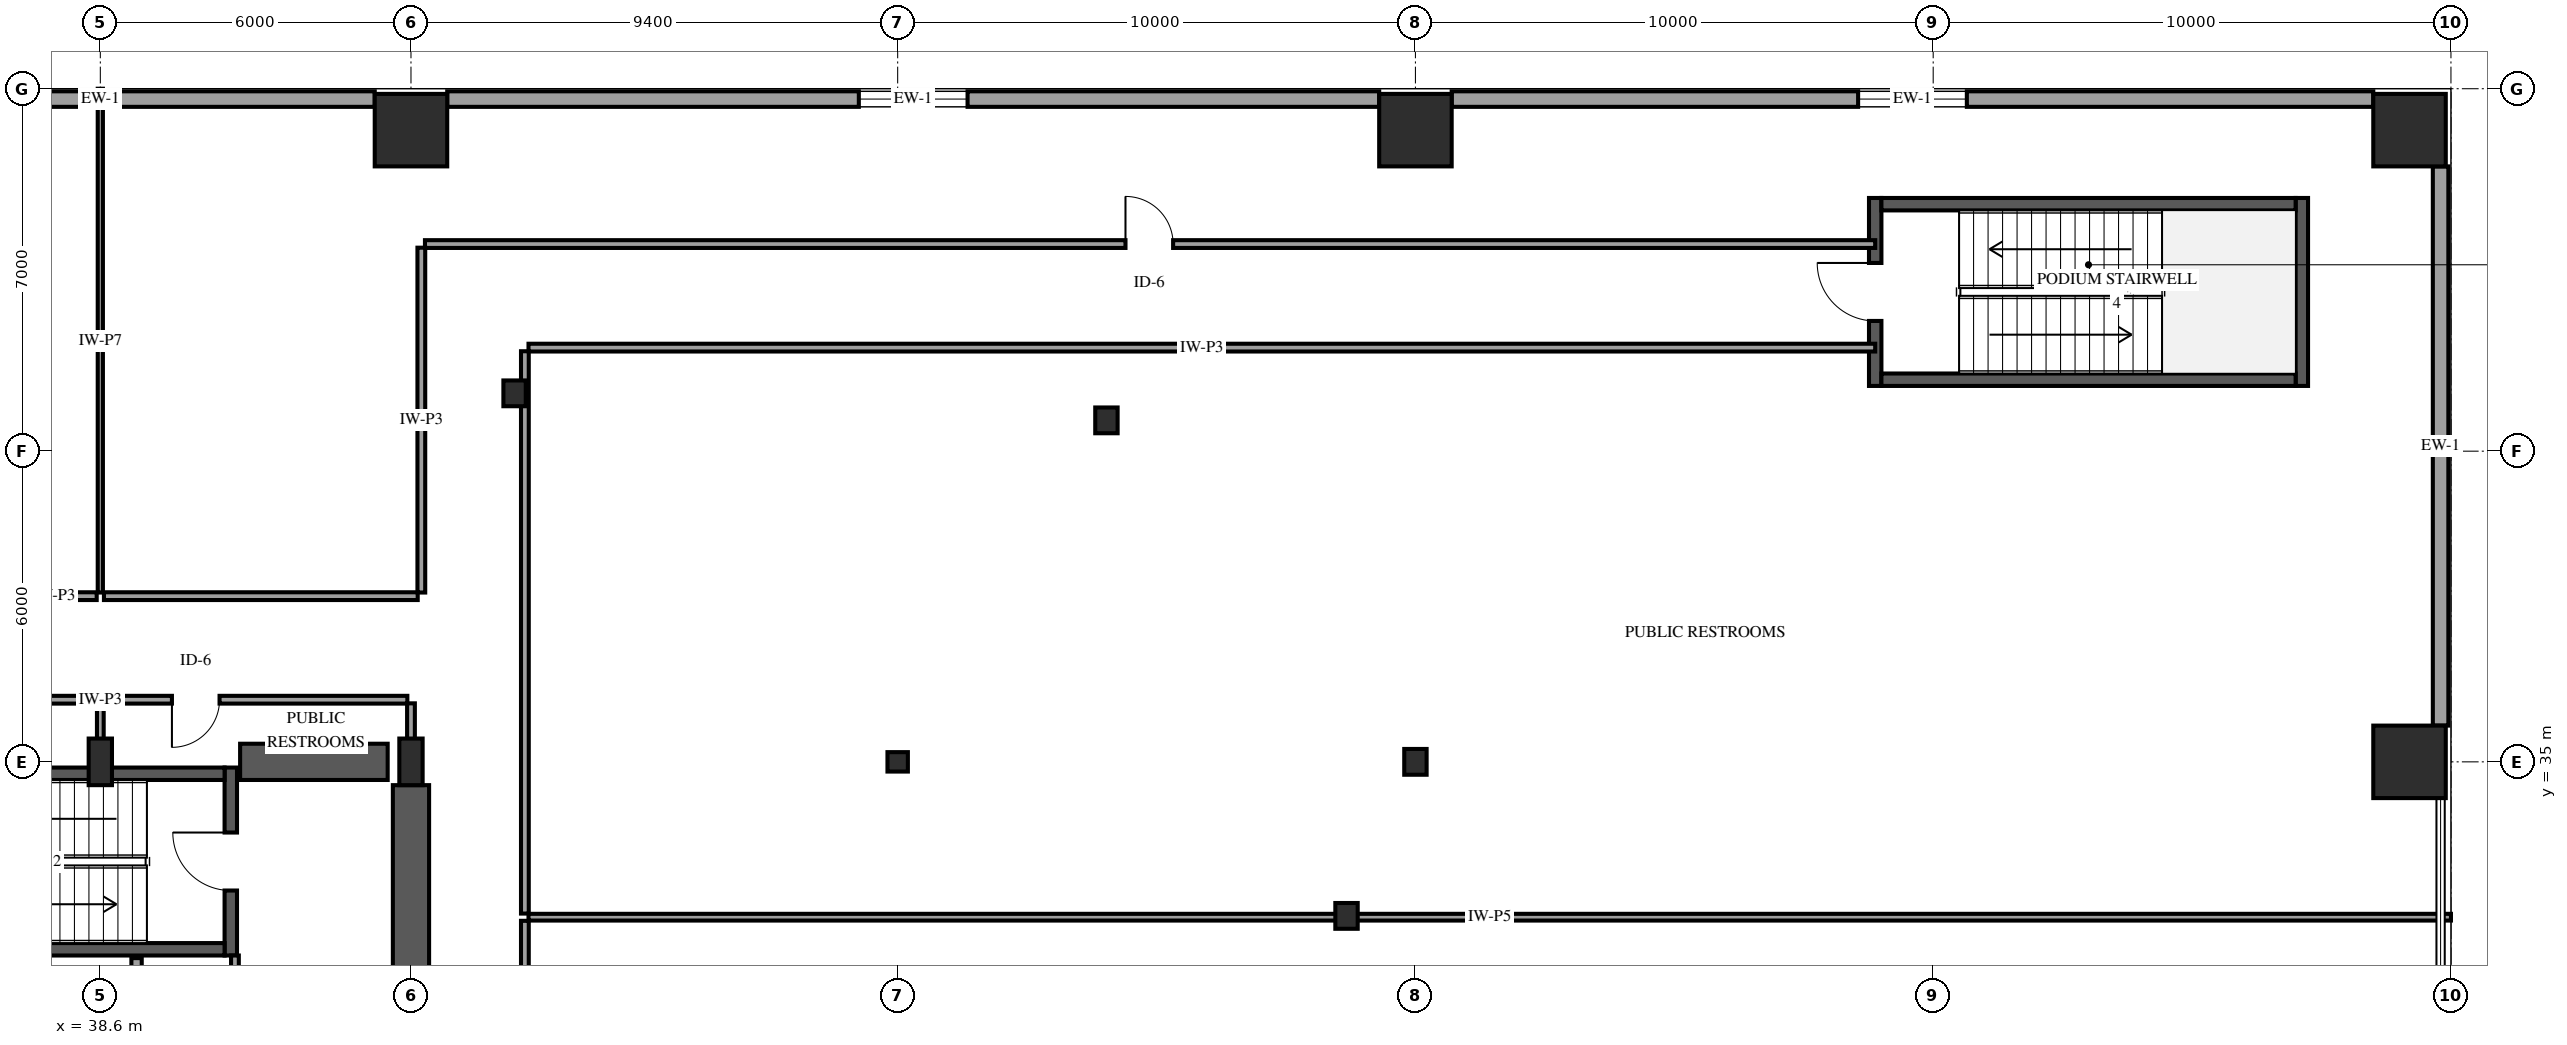
"""IFC4 building model, lengths in metres.
Left out: names, types, materials, properties, quantities, classifications, styles, units other than length and angle.
Written with IfcOpenShell. Run it as: python <this file> out.ifc"""

import sys

from ifc_helpers import new_model, si_unit, direction, frame, frame_2d, origin, origin_2d, place, context, subcontext, project, spatial, rectangle, i_section, extrude, element, fill, save


model = new_model("IFC4")
c1 = context("Model", 3, precision=1e-05, world=origin(), true_north=direction((0.0, 1.0)))
c2 = subcontext(c1, "Body", "Model", "MODEL_VIEW")
j1 = project(units=[si_unit("LENGTHUNIT", "METRE"), si_unit("PLANEANGLEUNIT", "RADIAN")], contexts=[c1])
p1 = place(None, origin())
s1 = spatial("IfcSite", under=j1, at=p1, CompositionType="ELEMENT")
p2 = place(p1, origin())
s2 = spatial("IfcBuilding", under=s1, at=p2, CompositionType="ELEMENT")
p3 = place(p2, frame((0.0, 0.0, 6.0)))
s3 = spatial("IfcBuildingStorey", under=s2, at=p3, CompositionType="ELEMENT", Elevation=6.0)
p4 = place(p3, frame((41.12, 31.26, 0.0), z_axis=(0.0, 0.0, 1.0), x_axis=(0.0, 1.0, 0.0)))
e1 = element("IfcWall", 1, at=p4, inside=s3, PredefinedType="SHEAR", context=c2, shape_type="SweptSolid", body=[
    extrude(rectangle(XDim=3.63, YDim=0.24, at=frame_2d((1.815, 0.0))), origin(), (0.0, 0.0, 1.0), 5.4),
])
p5 = place(p4, frame((1.255, 0.0, 0.0)))
e2 = element("IfcOpeningElement", 2, at=p5, cuts=e1, PredefinedType="OPENING", context=c2, shape_type="SweptSolid", body=[
    extrude(rectangle(XDim=1.12, YDim=2.15, at=frame_2d((0.56, 1.075))), frame((0.0, 0.13, 0.0), z_axis=(0.0, -1.0, 0.0), x_axis=(1.0, 0.0, 0.0)), (0.0, 0.0, 1.0), 0.26),
])
for number, where, z_axis, x_axis in (
    (3, (33.0, 31.38, 0.0), (0.0, 0.0, 1.0), (1.0, 0.0, 0.0)),
    (4, (33.0, 34.77, 0.0), (0.0, 0.0, 1.0), (1.0, 0.0, 0.0)),
):
    element("IfcWall", number, at=place(p3, frame(where, z_axis=z_axis, x_axis=x_axis)), inside=s3, PredefinedType="SHEAR", context=c2, shape_type="SweptSolid", body=[
        extrude(rectangle(XDim=8.0, YDim=0.24, at=frame_2d((4.0, 0.0))), origin(), (0.0, 0.0, 1.0), 5.4),
    ])
p6 = place(p3, frame((72.88, 42.26, 0.0), z_axis=(0.0, 0.0, 1.0), x_axis=(0.0, 1.0, 0.0)))
e5 = element("IfcWall", 5, at=p6, inside=s3, PredefinedType="SHEAR", context=c2, shape_type="SweptSolid", body=[
    extrude(rectangle(XDim=3.63, YDim=0.24, at=frame_2d((1.815, 0.0))), origin(), (0.0, 0.0, 1.0), 5.4),
])
p7 = place(p6, frame((1.255, 0.0, 0.0)))
e6 = element("IfcOpeningElement", 6, at=p7, cuts=e5, PredefinedType="OPENING", context=c2, shape_type="SweptSolid", body=[
    extrude(rectangle(XDim=1.12, YDim=2.15, at=frame_2d((0.56, 1.075))), frame((0.0, 0.13, 0.0), z_axis=(0.0, -1.0, 0.0), x_axis=(1.0, 0.0, 0.0)), (0.0, 0.0, 1.0), 0.26),
])
p8 = place(p3, frame((81.12, 42.26, 0.0), z_axis=(0.0, 0.0, 1.0), x_axis=(0.0, 1.0, 0.0)))
e7 = element("IfcWall", 7, at=p8, inside=s3, PredefinedType="SHEAR", context=c2, shape_type="SweptSolid", body=[
    extrude(rectangle(XDim=3.63, YDim=0.24, at=frame_2d((1.815, 0.0))), origin(), (0.0, 0.0, 1.0), 5.4),
])
for number, where, z_axis, x_axis in (
    (8, (73.0, 42.38, 0.0), (0.0, 0.0, 1.0), (1.0, 0.0, 0.0)),
    (9, (73.0, 45.77, 0.0), (0.0, 0.0, 1.0), (1.0, 0.0, 0.0)),
):
    element("IfcWall", number, at=place(p3, frame(where, z_axis=z_axis, x_axis=x_axis)), inside=s3, PredefinedType="SHEAR", context=c2, shape_type="SweptSolid", body=[
        extrude(rectangle(XDim=8.0, YDim=0.24, at=frame_2d((4.0, 0.0))), origin(), (0.0, 0.0, 1.0), 5.4),
    ])
p9 = place(p3, frame((41.3, 35.0, 0.0), z_axis=(0.0, 0.0, 1.0), x_axis=(1.0, 0.0, 0.0)))
e10 = element("IfcWall", 10, at=p9, inside=s3, PredefinedType="SHEAR", context=c2, shape_type="SweptSolid", body=[
    extrude(rectangle(XDim=2.85, YDim=0.7, at=frame_2d((1.425, 0.0))), origin(), (0.0, 0.0, 1.0), 5.4),
])
p10 = place(p3, frame((44.6, 29.8, 0.0), z_axis=(0.0, 0.0, 1.0), x_axis=(0.0, 1.0, 0.0)))
e11 = element("IfcWall", 11, at=p10, inside=s3, PredefinedType="SHEAR", context=c2, shape_type="SweptSolid", body=[
    extrude(rectangle(XDim=4.75, YDim=0.7, at=frame_2d((2.375, 0.0))), origin(), (0.0, 0.0, 1.0), 5.4),
])
for number, where, z_axis, x_axis in (
    (12, (38.6, 35.0, 0.0), (0.0, 0.0, 1.0), (1.0, 0.0, 0.0)),
    (13, (44.6, 35.0, 0.0), (0.0, 0.0, 1.0), (1.0, 0.0, 0.0)),
):
    element("IfcColumn", number, at=place(p3, frame(where, z_axis=z_axis, x_axis=x_axis)), inside=s3, PredefinedType="PILASTER", context=c2, shape_type="SweptSolid", body=[
        extrude(rectangle(XDim=0.45, YDim=0.9, at=origin_2d()), origin(), (0.0, 0.0, 1.0), 5.4),
    ])
p11 = place(p3, frame((64.0, 35.0, 0.0), z_axis=(0.0, 0.0, 1.0), x_axis=(1.0, 0.0, 0.0)))
e14 = element("IfcColumn", 14, at=p11, inside=s3, PredefinedType="COLUMN", context=c2, shape_type="SweptSolid", body=[
    extrude(i_section(OverallWidth=0.432, OverallDepth=0.498, WebThickness=0.056, FlangeThickness=0.089, FilletRadius=0.038, at=origin_2d()), origin(), (0.0, 0.0, 1.0), 5.4),
])
for number, where, z_axis, x_axis in (
    (15, (83.2, 35.0, 0.0), (0.0, 0.0, 1.0), (1.0, 0.0, 0.0)),
    (16, (64.0, 47.2, 0.0), (0.0, 0.0, 1.0), (1.0, 0.0, 0.0)),
    (17, (83.2, 47.2, 0.0), (0.0, 0.0, 1.0), (1.0, 0.0, 0.0)),
    (18, (44.6, 47.2, 0.0), (0.0, 0.0, 1.0), (1.0, 0.0, 0.0)),
):
    element("IfcColumn", number, at=place(p3, frame(where, z_axis=z_axis, x_axis=x_axis)), inside=s3, PredefinedType="COLUMN", context=c2, shape_type="SweptSolid", body=[
        extrude(rectangle(XDim=1.4, YDim=1.4, at=origin_2d()), origin(), (0.0, 0.0, 1.0), 5.4),
    ])
p12 = place(p3, frame((54.0, 35.0, 0.0), z_axis=(0.0, 0.0, 1.0), x_axis=(1.0, 0.0, 0.0)))
e19 = element("IfcColumn", 19, at=p12, inside=s3, PredefinedType="COLUMN", context=c2, shape_type="SweptSolid", body=[
    extrude(i_section(OverallWidth=0.394, OverallDepth=0.375, WebThickness=0.017, FlangeThickness=0.028, FilletRadius=0.038, at=origin_2d()), origin(), (0.0, 0.0, 1.0), 5.4),
])
for number, where, z_axis, x_axis in (
    (20, (62.669, 32.025, 0.0), (0.0, 0.0, 1.0), (1.0, 0.0, 0.0)),
    (21, (58.032, 41.595, 0.0), (0.0, 0.0, 1.0), (1.0, 0.0, 0.0)),
    (22, (46.601, 42.117, 0.0), (0.0, 0.0, 1.0), (1.0, 0.0, 0.0)),
):
    element("IfcColumn", number, at=place(p3, frame(where, z_axis=z_axis, x_axis=x_axis)), inside=s3, PredefinedType="COLUMN", context=c2, shape_type="SweptSolid", body=[
        extrude(i_section(OverallWidth=0.432, OverallDepth=0.498, WebThickness=0.056, FlangeThickness=0.089, FilletRadius=0.038, at=origin_2d()), origin(), (0.0, 0.0, 1.0), 5.4),
    ])
p13 = place(p3, frame((33.3, 47.8, 0.0), z_axis=(0.0, 0.0, 1.0), x_axis=(1.0, 0.0, 0.0)))
e23 = element("IfcWall", 23, at=p13, inside=s3, PredefinedType="SOLIDWALL", context=c2, shape_type="SweptSolid", body=[
    extrude(rectangle(XDim=10.6, YDim=0.3, at=frame_2d((5.3, 0.0))), origin(), (0.0, 0.0, 1.0), 4.136),
])
p14 = place(p13, frame((0.8, 0.0, 0.85)))
e24 = element("IfcOpeningElement", 24, at=p14, cuts=e23, PredefinedType="OPENING", context=c2, shape_type="SweptSolid", body=[
    extrude(rectangle(XDim=2.1, YDim=1.8, at=frame_2d((1.05, 0.9))), frame((0.0, 0.16, 0.0), z_axis=(0.0, -1.0, 0.0), x_axis=(1.0, 0.0, 0.0)), (0.0, 0.0, 1.0), 0.32),
])
p15 = place(p3, frame((45.3, 47.8, 0.0), z_axis=(0.0, 0.0, 1.0), x_axis=(1.0, 0.0, 0.0)))
e25 = element("IfcWall", 25, at=p15, inside=s3, PredefinedType="SOLIDWALL", context=c2, shape_type="SweptSolid", body=[
    extrude(rectangle(XDim=18.0, YDim=0.3, at=frame_2d((9.0, 0.0))), origin(), (0.0, 0.0, 1.0), 4.136),
])
p16 = place(p15, frame((7.95, 0.0, 0.85)))
e26 = element("IfcOpeningElement", 26, at=p16, cuts=e25, PredefinedType="OPENING", context=c2, shape_type="SweptSolid", body=[
    extrude(rectangle(XDim=2.1, YDim=1.8, at=frame_2d((1.05, 0.9))), frame((0.0, 0.16, 0.0), z_axis=(0.0, -1.0, 0.0), x_axis=(1.0, 0.0, 0.0)), (0.0, 0.0, 1.0), 0.32),
])
p17 = place(p3, frame((64.7, 47.8, 0.0), z_axis=(0.0, 0.0, 1.0), x_axis=(1.0, 0.0, 0.0)))
e27 = element("IfcWall", 27, at=p17, inside=s3, PredefinedType="SOLIDWALL", context=c2, shape_type="SweptSolid", body=[
    extrude(rectangle(XDim=17.8, YDim=0.3, at=frame_2d((8.9, 0.0))), origin(), (0.0, 0.0, 1.0), 4.136),
])
p18 = place(p17, frame((7.85, 0.0, 0.85)))
e28 = element("IfcOpeningElement", 28, at=p18, cuts=e27, PredefinedType="OPENING", context=c2, shape_type="SweptSolid", body=[
    extrude(rectangle(XDim=2.1, YDim=1.8, at=frame_2d((1.05, 0.9))), frame((0.0, 0.16, 0.0), z_axis=(0.0, -1.0, 0.0), x_axis=(1.0, 0.0, 0.0)), (0.0, 0.0, 1.0), 0.32),
])
p19 = place(p3, frame((83.8, 46.5, 0.0), z_axis=(0.0, 0.0, 1.0), x_axis=(0.0, -1.0, 0.0)))
e29 = element("IfcWall", 29, at=p19, inside=s3, PredefinedType="SOLIDWALL", context=c2, shape_type="SweptSolid", body=[
    extrude(rectangle(XDim=10.8, YDim=0.3, at=frame_2d((5.4, 0.0))), origin(), (0.0, 0.0, 1.0), 4.136),
])
p20 = place(p3, frame((39.3, 29.11, 0.0), z_axis=(0.0, 0.0, 1.0), x_axis=(0.0, 1.0, 0.0)))
e30 = element("IfcWall", 30, at=p20, inside=s3, PredefinedType="SOLIDWALL", context=c2, shape_type="SweptSolid", body=[
    extrude(rectangle(XDim=2.1, YDim=0.2, at=frame_2d((1.05, 0.0))), origin(), (0.0, 0.0, 1.0), 5.08),
])
p21 = place(p3, frame((46.87, 32.0, 0.0), z_axis=(0.0, 0.0, 1.0), x_axis=(1.0, 0.0, 0.0)))
e31 = element("IfcWall", 31, at=p21, inside=s3, PredefinedType="PARTITIONING", context=c2, shape_type="SweptSolid", body=[
    extrude(rectangle(XDim=37.13, YDim=0.13, at=frame_2d((18.565, 0.0))), origin(), (0.0, 0.0, 1.0), 5.08),
])
p22 = place(p3, frame((44.87, 45.0, 0.0), z_axis=(0.0, 0.0, 1.0), x_axis=(1.0, 0.0, 0.0)))
e32 = element("IfcWall", 32, at=p22, inside=s3, PredefinedType="PARTITIONING", context=c2, shape_type="SweptSolid", body=[
    extrude(rectangle(XDim=28.01, YDim=0.15, at=frame_2d((14.005, 0.0))), origin(), (0.0, 0.0, 1.0), 5.08),
])
p23 = place(p22, frame((13.53, 0.0, 0.0)))
e33 = element("IfcOpeningElement", 33, at=p23, cuts=e32, PredefinedType="OPENING", context=c2, shape_type="SweptSolid", body=[
    extrude(rectangle(XDim=0.92, YDim=2.12, at=frame_2d((0.46, 1.06))), frame((0.0, 0.085, 0.0), z_axis=(0.0, -1.0, 0.0), x_axis=(1.0, 0.0, 0.0)), (0.0, 0.0, 1.0), 0.17),
])
p24 = place(p3, frame((72.88, 43.0, 0.0), z_axis=(0.0, 0.0, 1.0), x_axis=(-1.0, 0.0, 0.0)))
e34 = element("IfcWall", 34, at=p24, inside=s3, PredefinedType="PARTITIONING", context=c2, shape_type="SweptSolid", body=[
    extrude(rectangle(XDim=26.01, YDim=0.15, at=frame_2d((13.005, 0.0))), origin(), (0.0, 0.0, 1.0), 5.08),
])
p25 = place(p3, frame((46.8, 31.93, 0.0), z_axis=(0.0, 0.0, 1.0), x_axis=(0.0, -1.0, 0.0)))
e35 = element("IfcWall", 35, at=p25, inside=s3, PredefinedType="PARTITIONING", context=c2, shape_type="SweptSolid", body=[
    extrude(rectangle(XDim=13.86, YDim=0.15, at=frame_2d((6.93, 0.0))), origin(), (0.0, 0.0, 1.0), 5.08),
])
p26 = place(p25, frame((6.455, 0.0, 0.0)))
e36 = element("IfcOpeningElement", 36, at=p26, cuts=e35, PredefinedType="OPENING", context=c2, shape_type="SweptSolid", body=[
    extrude(rectangle(XDim=0.92, YDim=2.12, at=frame_2d((0.46, 1.06))), frame((0.0, 0.085, 0.0), z_axis=(0.0, -1.0, 0.0), x_axis=(1.0, 0.0, 0.0)), (0.0, 0.0, 1.0), 0.17),
])
p27 = place(p3, frame((46.8, 42.93, 0.0), z_axis=(0.0, 0.0, 1.0), x_axis=(0.0, -1.0, 0.0)))
e37 = element("IfcWall", 37, at=p27, inside=s3, PredefinedType="PARTITIONING", context=c2, shape_type="SweptSolid", body=[
    extrude(rectangle(XDim=10.86, YDim=0.15, at=frame_2d((5.43, 0.0))), origin(), (0.0, 0.0, 1.0), 5.08),
])
p28 = place(p3, frame((38.6, 48.0, 0.0), z_axis=(0.0, 0.0, 1.0), x_axis=(0.0, -1.0, 0.0)))
e38 = element("IfcWall", 38, at=p28, inside=s3, PredefinedType="PARTITIONING", context=c2, shape_type="SweptSolid", body=[
    extrude(rectangle(XDim=9.73, YDim=0.1, at=frame_2d((4.865, 0.0))), origin(), (0.0, 0.0, 1.0), 5.08),
])
p29 = place(p3, frame((30.67, 38.2, 0.0), z_axis=(0.0, 0.0, 1.0), x_axis=(1.0, 0.0, 0.0)))
e39 = element("IfcWall", 39, at=p29, inside=s3, PredefinedType="PARTITIONING", context=c2, shape_type="SweptSolid", body=[
    extrude(rectangle(XDim=7.86, YDim=0.15, at=frame_2d((3.93, 0.0))), origin(), (0.0, 0.0, 1.0), 5.08),
])
p30 = place(p3, frame((44.8, 38.27, 0.0), z_axis=(0.0, 0.0, 1.0), x_axis=(0.0, 1.0, 0.0)))
e40 = element("IfcWall", 40, at=p30, inside=s3, PredefinedType="PARTITIONING", context=c2, shape_type="SweptSolid", body=[
    extrude(rectangle(XDim=6.66, YDim=0.15, at=frame_2d((3.33, 0.0))), origin(), (0.0, 0.0, 1.0), 4.202),
])
p31 = place(p3, frame((38.67, 38.2, 0.0), z_axis=(0.0, 0.0, 1.0), x_axis=(1.0, 0.0, 0.0)))
e41 = element("IfcWall", 41, at=p31, inside=s3, PredefinedType="PARTITIONING", context=c2, shape_type="SweptSolid", body=[
    extrude(rectangle(XDim=6.06, YDim=0.15, at=frame_2d((3.03, 0.0))), origin(), (0.0, 0.0, 1.0), 5.08),
])
p32 = place(p3, frame((38.53, 36.2, 0.0), z_axis=(0.0, 0.0, 1.0), x_axis=(-1.0, 0.0, 0.0)))
e42 = element("IfcWall", 42, at=p32, inside=s3, PredefinedType="PARTITIONING", context=c2, shape_type="SweptSolid", body=[
    extrude(rectangle(XDim=5.86, YDim=0.15, at=frame_2d((2.93, 0.0))), origin(), (0.0, 0.0, 1.0), 5.08),
])
p33 = place(p32, frame((2.455, 0.0, 0.0)))
e43 = element("IfcOpeningElement", 43, at=p33, cuts=e42, PredefinedType="OPENING", context=c2, shape_type="SweptSolid", body=[
    extrude(rectangle(XDim=0.92, YDim=2.12, at=frame_2d((0.46, 1.06))), frame((0.0, 0.085, 0.0), z_axis=(0.0, -1.0, 0.0), x_axis=(1.0, 0.0, 0.0)), (0.0, 0.0, 1.0), 0.17),
])
p34 = place(p3, frame((44.53, 36.2, 0.0), z_axis=(0.0, 0.0, 1.0), x_axis=(-1.0, 0.0, 0.0)))
e44 = element("IfcWall", 44, at=p34, inside=s3, PredefinedType="PARTITIONING", context=c2, shape_type="SweptSolid", body=[
    extrude(rectangle(XDim=5.86, YDim=0.15, at=frame_2d((2.93, 0.0))), origin(), (0.0, 0.0, 1.0), 5.08),
])
p35 = place(p34, frame((3.627, 0.0, 0.0)))
e45 = element("IfcOpeningElement", 45, at=p35, cuts=e44, PredefinedType="OPENING", context=c2, shape_type="SweptSolid", body=[
    extrude(rectangle(XDim=0.92, YDim=2.12, at=frame_2d((0.46, 1.06))), frame((0.0, 0.085, 0.0), z_axis=(0.0, -1.0, 0.0), x_axis=(1.0, 0.0, 0.0)), (0.0, 0.0, 1.0), 0.17),
])
p36 = place(p3, frame((41.2, 29.07, 0.0), z_axis=(0.0, 0.0, 1.0), x_axis=(0.0, 1.0, 0.0)))
e46 = element("IfcWall", 46, at=p36, inside=s3, PredefinedType="PARTITIONING", context=c2, shape_type="SweptSolid", body=[
    extrude(rectangle(XDim=2.19, YDim=0.15, at=frame_2d((1.095, 0.0))), origin(), (0.0, 0.0, 1.0), 5.08),
])
p37 = place(p36, frame((0.555, 0.0, 0.0)))
e47 = element("IfcOpeningElement", 47, at=p37, cuts=e46, PredefinedType="OPENING", context=c2, shape_type="SweptSolid", body=[
    extrude(rectangle(XDim=1.08, YDim=2.15, at=frame_2d((0.54, 1.075))), frame((0.0, 0.085, 0.0), z_axis=(0.0, -1.0, 0.0), x_axis=(1.0, 0.0, 0.0)), (0.0, 0.0, 1.0), 0.17),
])
p38 = place(p3, frame((44.6, 35.07, 0.0), z_axis=(0.0, 0.0, 1.0), x_axis=(0.0, 1.0, 0.0)))
e48 = element("IfcWall", 48, at=p38, inside=s3, PredefinedType="PARTITIONING", context=c2, shape_type="SweptSolid", body=[
    extrude(rectangle(XDim=1.06, YDim=0.15, at=frame_2d((0.53, 0.0))), origin(), (0.0, 0.0, 1.0), 4.202),
])
p39 = place(p3, frame((38.6, 36.13, 0.0), z_axis=(0.0, 0.0, 1.0), x_axis=(0.0, -1.0, 0.0)))
e49 = element("IfcWall", 49, at=p39, inside=s3, PredefinedType="PARTITIONING", context=c2, shape_type="SweptSolid", body=[
    extrude(rectangle(XDim=1.06, YDim=0.13, at=frame_2d((0.53, 0.0))), origin(), (0.0, 0.0, 1.0), 5.08),
])
p40 = place(p16, origin())
e50 = element("IfcWindow", 50, at=p40, inside=s3, PartitioningType="SINGLE_PANEL", PredefinedType="WINDOW", context=c2, shape_type="SweptSolid", body=[
    extrude(rectangle(XDim=2.1, YDim=1.8, at=frame_2d((1.05, 0.9))), frame((0.0, 0.03, 0.0), z_axis=(0.0, -1.0, 0.0), x_axis=(1.0, 0.0, 0.0)), (0.0, 0.0, 1.0), 0.06),
])
fill(e26, e50)
p41 = place(p18, origin())
e51 = element("IfcWindow", 51, at=p41, inside=s3, PartitioningType="SINGLE_PANEL", PredefinedType="WINDOW", context=c2, shape_type="SweptSolid", body=[
    extrude(rectangle(XDim=2.1, YDim=1.8, at=frame_2d((1.05, 0.9))), frame((0.0, 0.03, 0.0), z_axis=(0.0, -1.0, 0.0), x_axis=(1.0, 0.0, 0.0)), (0.0, 0.0, 1.0), 0.06),
])
fill(e28, e51)
p42 = place(p5, origin())
e52 = element("IfcDoor", 52, at=p42, inside=s3, OperationType="SINGLE_SWING_RIGHT", PredefinedType="DOOR", context=c2, shape_type="SweptSolid", body=[
    extrude(rectangle(XDim=1.12, YDim=2.15, at=frame_2d((0.56, 1.075))), frame((0.0, 0.025, 0.0), z_axis=(0.0, -1.0, 0.0), x_axis=(1.0, 0.0, 0.0)), (0.0, 0.0, 1.0), 0.05),
])
fill(e2, e52)
p43 = place(p7, origin())
e53 = element("IfcDoor", 53, at=p43, inside=s3, OperationType="SINGLE_SWING_RIGHT", PredefinedType="DOOR", context=c2, shape_type="SweptSolid", body=[
    extrude(rectangle(XDim=1.12, YDim=2.15, at=frame_2d((0.56, 1.075))), frame((0.0, 0.025, 0.0), z_axis=(0.0, -1.0, 0.0), x_axis=(1.0, 0.0, 0.0)), (0.0, 0.0, 1.0), 0.05),
])
fill(e6, e53)
p44 = place(p23, origin())
e54 = element("IfcDoor", 54, at=p44, inside=s3, OperationType="SINGLE_SWING_LEFT", PredefinedType="DOOR", context=c2, shape_type="SweptSolid", body=[
    extrude(rectangle(XDim=0.92, YDim=2.12, at=frame_2d((0.46, 1.06))), frame((0.0, 0.025, 0.0), z_axis=(0.0, -1.0, 0.0), x_axis=(1.0, 0.0, 0.0)), (0.0, 0.0, 1.0), 0.05),
])
fill(e33, e54)
p45 = place(p35, origin())
e55 = element("IfcDoor", 55, at=p45, inside=s3, OperationType="SINGLE_SWING_RIGHT", PredefinedType="DOOR", context=c2, shape_type="SweptSolid", body=[
    extrude(rectangle(XDim=0.92, YDim=2.12, at=frame_2d((0.46, 1.06))), frame((0.0, 0.025, 0.0), z_axis=(0.0, -1.0, 0.0), x_axis=(1.0, 0.0, 0.0)), (0.0, 0.0, 1.0), 0.05),
])
fill(e45, e55)
save(model, sys.argv[1])
